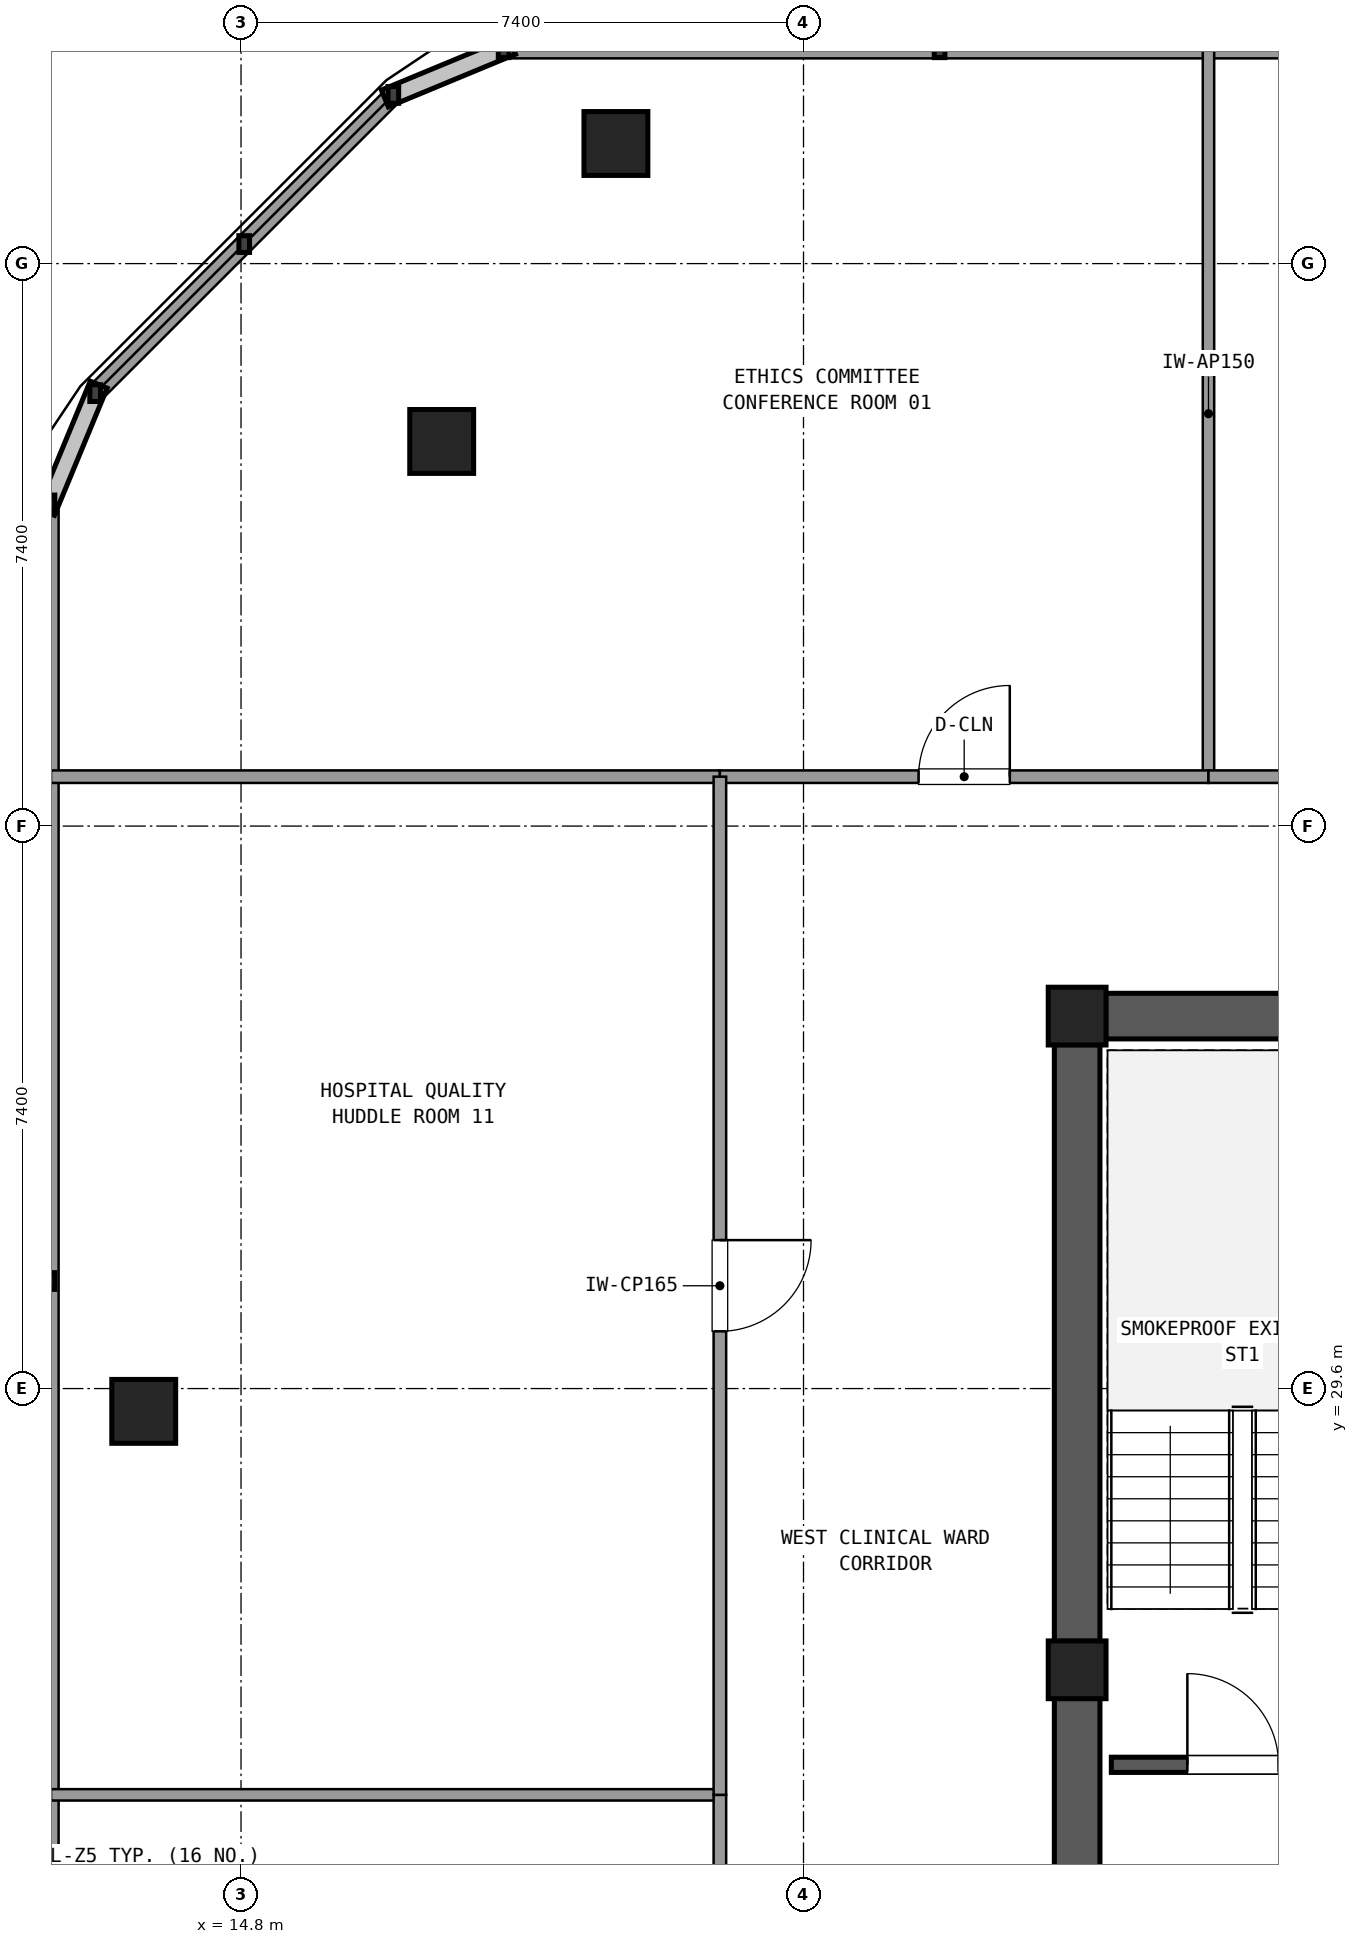
"""IFC4 building model, lengths in metres.
Left out: names, types, materials, properties, quantities, classifications, styles, units other than length and angle.
Written with IfcOpenShell. Run it as: python <this file> out.ifc"""

import sys

from ifc_helpers import new_model, si_unit, direction, frame, frame_2d, origin, origin_2d, place, context, subcontext, project, spatial, rectangle, extrude, element, fill, save


model = new_model("IFC4")
c1 = context("Model", 3, precision=1e-05, world=origin(), true_north=direction((0.0, 1.0)))
c2 = subcontext(c1, "Body", "Model", "MODEL_VIEW")
j1 = project(units=[si_unit("LENGTHUNIT", "METRE"), si_unit("PLANEANGLEUNIT", "RADIAN")], contexts=[c1])
p1 = place(None, origin())
s1 = spatial("IfcSite", under=j1, at=p1, CompositionType="ELEMENT")
p2 = place(p1, origin())
s2 = spatial("IfcBuilding", under=s1, at=p2, CompositionType="ELEMENT")
p3 = place(p2, frame((0.0, 0.0, 275.22)))
s3 = spatial("IfcBuildingStorey", under=s2, at=p3, CompositionType="ELEMENT", Elevation=275.22)
for number, where, z_axis, x_axis in (
    (1, (25.8, 34.5, 0.0), (0.0, 0.0, 1.0), (1.0, 0.0, 0.0)),
    (2, (25.8, 25.9, 0.0), (0.0, 0.0, 1.0), (1.0, 0.0, 0.0)),
):
    element("IfcColumn", number, at=place(p3, frame(where, z_axis=z_axis, x_axis=x_axis)), inside=s3, PredefinedType="COLUMN", context=c2, shape_type="SweptSolid", body=[
        extrude(rectangle(XDim=0.76, YDim=0.76, at=origin_2d()), origin(), (0.0, 0.0, 1.0), 3.6),
    ])
p4 = place(p3, frame((36.625, 34.5, 0.0), z_axis=(0.0, 0.0, 1.0), x_axis=(-1.0, 0.0, 0.0)))
e3 = element("IfcWall", 3, at=p4, inside=s3, PredefinedType="SHEAR", context=c2, shape_type="SweptSolid", body=[
    extrude(rectangle(XDim=10.45, YDim=0.6, at=frame_2d((5.225, 0.0))), origin(), (0.0, 0.0, 1.0), 3.32),
])
p5 = place(p4, frame((4.225, 0.0, 0.0)))
e4 = element("IfcOpeningElement", 4, at=p5, cuts=e3, PredefinedType="OPENING", context=c2, shape_type="SweptSolid", body=[
    extrude(rectangle(XDim=1.2, YDim=2.15, at=frame_2d((0.6, 1.075))), frame((0.0, 0.31, 0.0), z_axis=(0.0, -1.0, 0.0), x_axis=(1.0, 0.0, 0.0)), (0.0, 0.0, 1.0), 0.62),
])
p6 = place(p3, frame((25.8, 34.125, 0.0), z_axis=(0.0, 0.0, 1.0), x_axis=(0.0, -1.0, 0.0)))
e5 = element("IfcWall", 5, at=p6, inside=s3, PredefinedType="SHEAR", context=c2, shape_type="SweptSolid", body=[
    extrude(rectangle(XDim=7.85, YDim=0.6, at=frame_2d((3.925, 0.0))), origin(), (0.0, 0.0, 1.0), 3.32),
])
p7 = place(p3, frame((25.8, 25.525, 0.0), z_axis=(0.0, 0.0, 1.0), x_axis=(0.0, -1.0, 0.0)))
e6 = element("IfcWall", 6, at=p7, inside=s3, PredefinedType="SHEAR", context=c2, shape_type="SweptSolid", body=[
    extrude(rectangle(XDim=7.85, YDim=0.6, at=frame_2d((3.925, 0.0))), origin(), (0.0, 0.0, 1.0), 3.32),
])
p8 = place(p7, frame((2.275, 0.0, 0.0)))
e7 = element("IfcOpeningElement", 7, at=p8, cuts=e6, PredefinedType="OPENING", context=c2, shape_type="SweptSolid", body=[
    extrude(rectangle(XDim=1.2, YDim=2.15, at=frame_2d((0.6, 1.075))), frame((0.0, 0.31, 0.0), z_axis=(0.0, -1.0, 0.0), x_axis=(1.0, 0.0, 0.0)), (0.0, 0.0, 1.0), 0.62),
])
for number, where, z_axis, x_axis in (
    (8, (19.732, 45.98, 0.0), (0.0, 0.0, 1.0), (1.0, 0.0, 0.0)),
    (9, (17.44, 42.06, 0.0), (0.0, 0.0, 1.0), (1.0, 0.0, 0.0)),
    (10, (13.52, 29.3, 0.0), (0.0, 0.0, 1.0), (1.0, 0.0, 0.0)),
):
    element("IfcColumn", number, at=place(p3, frame(where, z_axis=z_axis, x_axis=x_axis)), inside=s3, PredefinedType="COLUMN", context=c2, shape_type="SweptSolid", body=[
        extrude(rectangle(XDim=0.84, YDim=0.84, at=origin_2d()), origin(), (0.0, 0.0, 1.0), 3.6),
    ])
p9 = place(p3, frame((35.461, 47.22, 0.0), z_axis=(0.0, 0.0, 1.0), x_axis=(-1.0, 0.0, 0.0)))
e11 = element("IfcWall", 11, at=p9, inside=s3, PredefinedType="SOLIDWALL", context=c2, shape_type="SweptSolid", body=[
    extrude(rectangle(XDim=17.206, YDim=0.24, at=frame_2d((8.603, 0.0))), origin(), (0.0, 0.0, 1.0), 0.85),
])
p10 = place(p3, frame((16.804, 46.619, 0.0), z_axis=(0.0, 0.0, 1.0), x_axis=(-0.707106781187, -0.707106781187, 0.0)))
e12 = element("IfcWall", 12, at=p10, inside=s3, PredefinedType="SOLIDWALL", context=c2, shape_type="SweptSolid", body=[
    extrude(rectangle(XDim=5.548, YDim=0.24, at=frame_2d((2.774, 0.0))), origin(), (0.0, 0.0, 1.0), 0.85),
])
p11 = place(p3, frame((12.28, 41.245, 0.0), z_axis=(0.0, 0.0, 1.0), x_axis=(0.0, -1.0, 0.0)))
e13 = element("IfcWall", 13, at=p11, inside=s3, PredefinedType="SOLIDWALL", context=c2, shape_type="SweptSolid", body=[
    extrude(rectangle(XDim=30.69, YDim=0.24, at=frame_2d((15.345, 0.0))), origin(), (0.0, 0.0, 1.0), 0.85),
])
p12 = place(p3, frame((26.25, 24.65, 0.0), z_axis=(0.0, 0.0, 1.0), x_axis=(1.0, 0.0, 0.0)))
e14 = element("IfcWall", 14, at=p12, inside=s3, PredefinedType="SHEAR", context=c2, shape_type="SweptSolid", body=[
    extrude(rectangle(XDim=4.0, YDim=0.2, at=frame_2d((2.0, 0.0))), origin(), (0.0, 0.0, 1.0), 3.32),
])
p13 = place(p12, frame((1.0, 0.0, 0.0)))
e15 = element("IfcOpeningElement", 15, at=p13, cuts=e14, PredefinedType="OPENING", context=c2, shape_type="SweptSolid", body=[
    extrude(rectangle(XDim=1.2, YDim=2.15, at=frame_2d((0.6, 1.075))), frame((0.0, 0.11, 0.0), z_axis=(0.0, -1.0, 0.0), x_axis=(1.0, 0.0, 0.0)), (0.0, 0.0, 1.0), 0.22),
])
p14 = place(p3, frame((12.3, 37.65, 0.0), z_axis=(0.0, 0.0, 1.0), x_axis=(1.0, 0.0, 0.0)))
e16 = element("IfcWall", 16, at=p14, inside=s3, PredefinedType="PARTITIONING", context=c2, shape_type="SweptSolid", body=[
    extrude(rectangle(XDim=8.8, YDim=0.165, at=frame_2d((4.4, 0.0))), origin(), (0.0, 0.0, 1.0), 2.61),
])
p15 = place(p3, frame((27.528, 37.65, 0.0), z_axis=(0.0, 0.0, 1.0), x_axis=(0.0, 1.0, 0.0)))
e17 = element("IfcWall", 17, at=p15, inside=s3, PredefinedType="PARTITIONING", context=c2, shape_type="SweptSolid", body=[
    extrude(rectangle(XDim=9.55, YDim=0.15, at=frame_2d((4.775, 0.0))), origin(), (0.0, 0.0, 1.0), 2.61),
])
p16 = place(p3, frame((21.1, 37.65, 0.0), z_axis=(0.0, 0.0, 1.0), x_axis=(1.0, 0.0, 0.0)))
e18 = element("IfcWall", 18, at=p16, inside=s3, PredefinedType="PARTITIONING", context=c2, shape_type="SweptSolid", body=[
    extrude(rectangle(XDim=6.428, YDim=0.165, at=frame_2d((3.214, 0.0))), origin(), (0.0, 0.0, 1.0), 2.61),
])
p17 = place(p16, frame((2.614, 0.0, 0.0)))
e19 = element("IfcOpeningElement", 19, at=p17, cuts=e18, PredefinedType="OPENING", context=c2, shape_type="SweptSolid", body=[
    extrude(rectangle(XDim=1.2, YDim=2.15, at=frame_2d((0.6, 1.075))), frame((0.0, 0.093, 0.0), z_axis=(0.0, -1.0, 0.0), x_axis=(1.0, 0.0, 0.0)), (0.0, 0.0, 1.0), 0.185),
])
p18 = place(p3, frame((27.528, 37.65, 0.0), z_axis=(0.0, 0.0, 1.0), x_axis=(1.0, 0.0, 0.0)))
e20 = element("IfcWall", 20, at=p18, inside=s3, PredefinedType="PARTITIONING", context=c2, shape_type="SweptSolid", body=[
    extrude(rectangle(XDim=12.787, YDim=0.165, at=frame_2d((6.394, 0.0))), origin(), (0.0, 0.0, 1.0), 2.61),
])
p19 = place(p18, frame((5.793, 0.0, 0.0)))
e21 = element("IfcOpeningElement", 21, at=p19, cuts=e20, PredefinedType="OPENING", context=c2, shape_type="SweptSolid", body=[
    extrude(rectangle(XDim=1.2, YDim=2.15, at=frame_2d((0.6, 1.075))), frame((0.0, 0.093, 0.0), z_axis=(0.0, -1.0, 0.0), x_axis=(1.0, 0.0, 0.0)), (0.0, 0.0, 1.0), 0.185),
])
p20 = place(p3, frame((21.1, 24.255, 0.0), z_axis=(0.0, 0.0, 1.0), x_axis=(-1.0, 0.0, 0.0)))
e22 = element("IfcWall", 22, at=p20, inside=s3, PredefinedType="PARTITIONING", context=c2, shape_type="SweptSolid", body=[
    extrude(rectangle(XDim=8.8, YDim=0.15, at=frame_2d((4.4, 0.0))), origin(), (0.0, 0.0, 1.0), 2.61),
])
p21 = place(p3, frame((21.1, 14.15, 0.0), z_axis=(0.0, 0.0, 1.0), x_axis=(0.0, 1.0, 0.0)))
e23 = element("IfcWall", 23, at=p21, inside=s3, PredefinedType="PARTITIONING", context=c2, shape_type="SweptSolid", body=[
    extrude(rectangle(XDim=10.105, YDim=0.165, at=frame_2d((5.052, 0.0))), origin(), (0.0, 0.0, 1.0), 2.61),
])
p22 = place(p21, frame((4.452, 0.0, 0.0)))
e24 = element("IfcOpeningElement", 24, at=p22, cuts=e23, PredefinedType="OPENING", context=c2, shape_type="SweptSolid", body=[
    extrude(rectangle(XDim=1.2, YDim=2.15, at=frame_2d((0.6, 1.075))), frame((0.0, 0.093, 0.0), z_axis=(0.0, -1.0, 0.0), x_axis=(1.0, 0.0, 0.0)), (0.0, 0.0, 1.0), 0.185),
])
p23 = place(p3, frame((21.1, 24.255, 0.0), z_axis=(0.0, 0.0, 1.0), x_axis=(0.0, 1.0, 0.0)))
e25 = element("IfcWall", 25, at=p23, inside=s3, PredefinedType="PARTITIONING", context=c2, shape_type="SweptSolid", body=[
    extrude(rectangle(XDim=13.395, YDim=0.165, at=frame_2d((6.698, 0.0))), origin(), (0.0, 0.0, 1.0), 2.61),
])
p24 = place(p23, frame((6.098, 0.0, 0.0)))
e26 = element("IfcOpeningElement", 26, at=p24, cuts=e25, PredefinedType="OPENING", context=c2, shape_type="SweptSolid", body=[
    extrude(rectangle(XDim=1.2, YDim=2.15, at=frame_2d((0.6, 1.075))), frame((0.0, 0.093, 0.0), z_axis=(0.0, -1.0, 0.0), x_axis=(1.0, 0.0, 0.0)), (0.0, 0.0, 1.0), 0.185),
])
p25 = place(p13, origin())
e27 = element("IfcDoor", 27, at=p25, inside=s3, OperationType="SINGLE_SWING_LEFT", PredefinedType="DOOR", context=c2, shape_type="SweptSolid", body=[
    extrude(rectangle(XDim=1.2, YDim=2.15, at=frame_2d((0.6, 1.075))), frame((0.0, 0.025, 0.0), z_axis=(0.0, -1.0, 0.0), x_axis=(1.0, 0.0, 0.0)), (0.0, 0.0, 1.0), 0.05),
])
fill(e15, e27)
p26 = place(p17, origin())
e28 = element("IfcDoor", 28, at=p26, inside=s3, OperationType="SINGLE_SWING_RIGHT", PredefinedType="DOOR", context=c2, shape_type="SweptSolid", body=[
    extrude(rectangle(XDim=1.2, YDim=2.15, at=frame_2d((0.6, 1.075))), frame((0.0, 0.025, 0.0), z_axis=(0.0, -1.0, 0.0), x_axis=(1.0, 0.0, 0.0)), (0.0, 0.0, 1.0), 0.05),
])
fill(e19, e28)
p27 = place(p24, frame((1.2, 0.0, 0.0), z_axis=(0.0, 0.0, 1.0), x_axis=(-1.0, 0.0, 0.0)))
e29 = element("IfcDoor", 29, at=p27, inside=s3, OperationType="SINGLE_SWING_RIGHT", PredefinedType="DOOR", context=c2, shape_type="SweptSolid", body=[
    extrude(rectangle(XDim=1.2, YDim=2.15, at=frame_2d((0.6, 1.075))), frame((0.0, 0.025, 0.0), z_axis=(0.0, -1.0, 0.0), x_axis=(1.0, 0.0, 0.0)), (0.0, 0.0, 1.0), 0.05),
])
fill(e26, e29)
save(model, sys.argv[1])
